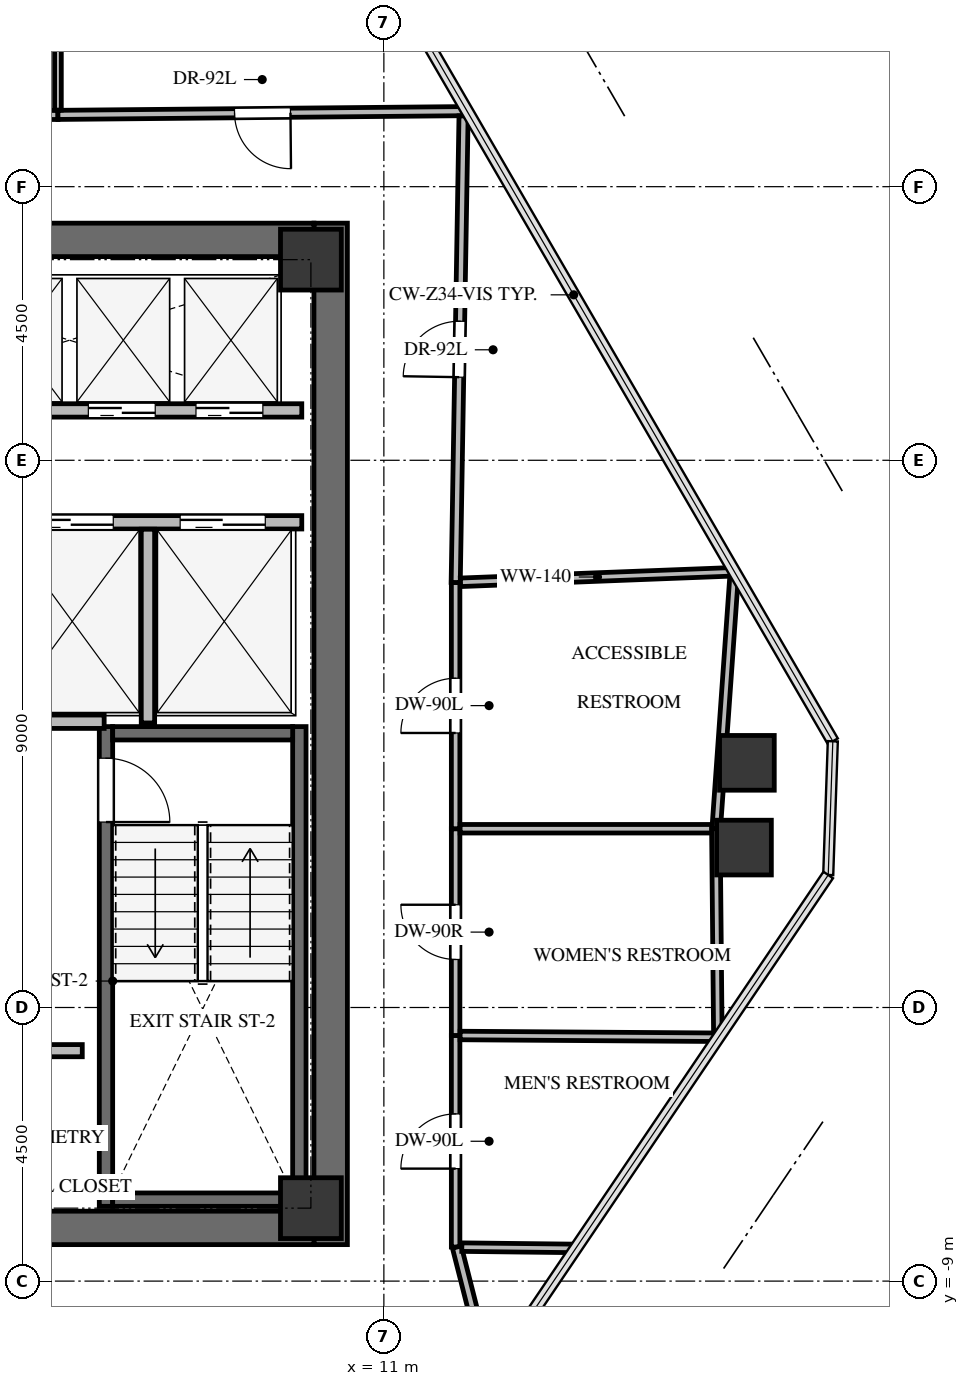
"""IFC4 building model, lengths in metres.
Left out: names, types, materials, properties, quantities, classifications, styles, units other than length and angle.
Written with IfcOpenShell. Run it as: python <this file> out.ifc"""

import sys

from ifc_helpers import new_model, si_unit, direction, frame, frame_2d, origin, origin_2d, place, context, subcontext, project, spatial, rectangle, extrude, source, transform, mapped, element, fill, save


model = new_model("IFC4")
c1 = context("Model", 3, precision=1e-05, world=origin(), true_north=direction((0.0, 1.0)))
c2 = subcontext(c1, "Body", "Model", "MODEL_VIEW")
j1 = project(units=[si_unit("LENGTHUNIT", "METRE"), si_unit("PLANEANGLEUNIT", "RADIAN")], contexts=[c1])
p1 = place(None, origin())
s1 = spatial("IfcSite", under=j1, at=p1, CompositionType="ELEMENT")
p2 = place(p1, origin())
s2 = spatial("IfcBuilding", under=s1, at=p2, CompositionType="ELEMENT")
p3 = place(p2, frame((0.0, 0.0, 261.5)))
s3 = spatial("IfcBuildingStorey", under=s2, at=p3, CompositionType="ELEMENT", Elevation=261.5)
p4 = place(p3, frame((10.125, -8.4, 0.0), z_axis=(0.0, 0.0, 1.0), x_axis=(0.0, 1.0, 0.0)))
e1 = element("IfcWall", 1, at=p4, inside=s3, PredefinedType="SHEAR", context=c2, shape_type="SweptSolid", body=[
    extrude(rectangle(XDim=16.8, YDim=0.55, at=frame_2d((8.4, 0.0))), origin(), (0.0, 0.0, 1.0), 3.4),
])
p5 = place(p3, frame((2.1, -8.125, 0.0), z_axis=(0.0, 0.0, 1.0), x_axis=(1.0, 0.0, 0.0)))
e2 = element("IfcWall", 2, at=p5, inside=s3, PredefinedType="SHEAR", context=c2, shape_type="SweptSolid", body=[
    extrude(rectangle(XDim=7.75, YDim=0.55, at=frame_2d((3.875, 0.0))), origin(), (0.0, 0.0, 1.0), 3.4),
])
p6 = place(p3, frame((-9.85, 8.125, 0.0), z_axis=(0.0, 0.0, 1.0), x_axis=(1.0, 0.0, 0.0)))
e3 = element("IfcWall", 3, at=p6, inside=s3, PredefinedType="SHEAR", context=c2, shape_type="SweptSolid", body=[
    extrude(rectangle(XDim=19.7, YDim=0.55, at=frame_2d((9.85, 0.0))), origin(), (0.0, 0.0, 1.0), 3.4),
])
p7 = place(p3, frame((9.61, -7.77, -0.24), z_axis=(0.0, 0.0, 1.0), x_axis=(0.0, 1.0, 0.0)))
e4 = element("IfcWall", 4, at=p7, inside=s3, PredefinedType="SHEAR", context=c2, shape_type="SweptSolid", body=[
    extrude(rectangle(XDim=7.89, YDim=0.22, at=frame_2d((3.945, 0.0))), origin(), (0.0, 0.0, 1.0), 3.34),
])
p8 = place(p3, frame((6.43, 0.12, -0.24), z_axis=(0.0, 0.0, 1.0), x_axis=(0.0, -1.0, 0.0)))
e5 = element("IfcWall", 5, at=p8, inside=s3, PredefinedType="SHEAR", context=c2, shape_type="SweptSolid", body=[
    extrude(rectangle(XDim=7.89, YDim=0.22, at=frame_2d((3.945, 0.0))), origin(), (0.0, 0.0, 1.0), 3.34),
])
p9 = place(p8, frame((0.52, 0.0, 0.0)))
e6 = element("IfcOpeningElement", 6, at=p9, cuts=e5, PredefinedType="OPENING", context=c2, shape_type="SweptSolid", body=[
    extrude(rectangle(XDim=1.05, YDim=2.15, at=frame_2d((0.525, 1.075))), frame((0.0, 0.12, 0.0), z_axis=(0.0, -1.0, 0.0), x_axis=(1.0, 0.0, 0.0)), (0.0, 0.0, 1.0), 0.24),
])
for number, where, z_axis, x_axis in (
    (7, (6.54, -7.66, -0.24), (0.0, 0.0, 1.0), (1.0, 0.0, 0.0)),
    (8, (9.5, 0.01, -0.24), (0.0, 0.0, 1.0), (-1.0, 0.0, 0.0)),
):
    element("IfcWall", number, at=place(p3, frame(where, z_axis=z_axis, x_axis=x_axis)), inside=s3, PredefinedType="SHEAR", context=c2, shape_type="SweptSolid", body=[
        extrude(rectangle(XDim=2.96, YDim=0.22, at=frame_2d((1.48, 0.0))), origin(), (0.0, 0.0, 1.0), 3.34),
    ])
m1 = source(origin(), c2, "Body", "SweptSolid", [
    extrude(rectangle(XDim=1.0, YDim=1.0, at=origin_2d()), origin(), (0.0, 0.0, 1.0), 3.34),
])
for number, where, z_axis, x_axis in (
    (9, (9.8, -7.8, -0.24), (0.0, 0.0, 1.0), (1.0, 0.0, 0.0)),
    (10, (9.8, 7.8, -0.24), (0.0, 0.0, 1.0), (1.0, 0.0, 0.0)),
):
    element("IfcColumn", number, at=place(p3, frame(where, z_axis=z_axis, x_axis=x_axis)), inside=s3, PredefinedType="COLUMN", context=c2, shape_type="MappedRepresentation", body=[
        mapped(m1, transform((0.0, 0.0, 0.0), x_axis=(1.0, 0.0, 0.0), y_axis=(0.0, 1.0, 0.0), z_axis=(0.0, 0.0, 1.0), scale=1.0)),
    ])
m2 = source(origin(), c2, "Body", "SweptSolid", [
    extrude(rectangle(XDim=0.9, YDim=0.9, at=origin_2d()), origin(), (0.0, 0.0, 1.0), 3.34),
])
for number, where, z_axis, x_axis in (
    (11, (16.97, -0.476, -0.24), (0.0, 0.0, 1.0), (1.0, 0.0, 0.0)),
    (12, (16.922, -1.87, -0.24), (0.0, 0.0, 1.0), (1.0, 0.0, 0.0)),
):
    element("IfcColumn", number, at=place(p3, frame(where, z_axis=z_axis, x_axis=x_axis)), inside=s3, PredefinedType="COLUMN", context=c2, shape_type="MappedRepresentation", body=[
        mapped(m2, transform((0.0, 0.0, 0.0), x_axis=(1.0, 0.0, 0.0), y_axis=(0.0, 1.0, 0.0), z_axis=(0.0, 0.0, 1.0), scale=1.0)),
    ])
p10 = place(p3, frame((4.6, 3.48, 0.0), z_axis=(0.0, 0.0, 1.0), x_axis=(1.0, 0.0, 0.0)))
e13 = element("IfcWall", 13, at=p10, inside=s3, PredefinedType="SOLIDWALL", context=c2, shape_type="SweptSolid", body=[
    extrude(rectangle(XDim=5.05, YDim=0.22, at=frame_2d((2.525, 0.0))), origin(), (0.0, 0.0, 1.0), 3.085),
])
p11 = place(p10, frame((0.55, 0.0, 0.0)))
e14 = element("IfcOpeningElement", 14, at=p11, cuts=e13, PredefinedType="OPENING", context=c2, shape_type="SweptSolid", body=[
    extrude(rectangle(XDim=1.4, YDim=2.15, at=frame_2d((0.7, 1.075))), frame((0.0, 0.12, 0.0), z_axis=(0.0, -1.0, 0.0), x_axis=(1.0, 0.0, 0.0)), (0.0, 0.0, 1.0), 0.24),
])
p12 = place(p10, frame((3.05, 0.0, 0.0)))
e15 = element("IfcOpeningElement", 15, at=p12, cuts=e13, PredefinedType="OPENING", context=c2, shape_type="SweptSolid", body=[
    extrude(rectangle(XDim=1.4, YDim=2.15, at=frame_2d((0.7, 1.075))), frame((0.0, 0.12, 0.0), z_axis=(0.0, -1.0, 0.0), x_axis=(1.0, 0.0, 0.0)), (0.0, 0.0, 1.0), 0.24),
])
p13 = place(p3, frame((7.12, 0.18, 0.0), z_axis=(0.0, 0.0, 1.0), x_axis=(0.0, 1.0, 0.0)))
e16 = element("IfcWall", 16, at=p13, inside=s3, PredefinedType="SOLIDWALL", context=c2, shape_type="SweptSolid", body=[
    extrude(rectangle(XDim=3.186, YDim=0.22, at=frame_2d((1.593, 0.0))), origin(), (0.0, 0.0, 1.0), 3.085),
])
p14 = place(p3, frame((4.734, 0.2, 0.0), z_axis=(0.0, 0.0, 1.0), x_axis=(1.0, 0.0, 0.0)))
e17 = element("IfcWall", 17, at=p14, inside=s3, PredefinedType="SOLIDWALL", context=c2, shape_type="SweptSolid", body=[
    extrude(rectangle(XDim=1.666, YDim=0.22, at=frame_2d((0.833, 0.0))), origin(), (0.0, 0.0, 1.0), 3.085),
])
p15 = place(p3, frame((2.325, 5.32, 0.0), z_axis=(0.0, 0.0, 1.0), x_axis=(1.0, 0.0, 0.0)))
e18 = element("IfcWall", 18, at=p15, inside=s3, PredefinedType="SOLIDWALL", context=c2, shape_type="SweptSolid", body=[
    extrude(rectangle(XDim=7.325, YDim=0.22, at=frame_2d((3.663, 0.0))), origin(), (0.0, 0.0, 1.0), 3.085),
])
p16 = place(p15, frame((0.275, 0.0, 0.0)))
e19 = element("IfcOpeningElement", 19, at=p16, cuts=e18, PredefinedType="OPENING", context=c2, shape_type="SweptSolid", body=[
    extrude(rectangle(XDim=1.1, YDim=2.15, at=frame_2d((0.55, 1.075))), frame((0.0, 0.12, 0.0), z_axis=(0.0, -1.0, 0.0), x_axis=(1.0, 0.0, 0.0)), (0.0, 0.0, 1.0), 0.24),
])
p17 = place(p15, frame((2.045, 0.0, 0.0)))
e20 = element("IfcOpeningElement", 20, at=p17, cuts=e18, PredefinedType="OPENING", context=c2, shape_type="SweptSolid", body=[
    extrude(rectangle(XDim=1.1, YDim=2.15, at=frame_2d((0.55, 1.075))), frame((0.0, 0.12, 0.0), z_axis=(0.0, -1.0, 0.0), x_axis=(1.0, 0.0, 0.0)), (0.0, 0.0, 1.0), 0.24),
])
p18 = place(p15, frame((3.815, 0.0, 0.0)))
e21 = element("IfcOpeningElement", 21, at=p18, cuts=e18, PredefinedType="OPENING", context=c2, shape_type="SweptSolid", body=[
    extrude(rectangle(XDim=1.1, YDim=2.15, at=frame_2d((0.55, 1.075))), frame((0.0, 0.12, 0.0), z_axis=(0.0, -1.0, 0.0), x_axis=(1.0, 0.0, 0.0)), (0.0, 0.0, 1.0), 0.24),
])
p19 = place(p15, frame((5.585, 0.0, 0.0)))
e22 = element("IfcOpeningElement", 22, at=p19, cuts=e18, PredefinedType="OPENING", context=c2, shape_type="SweptSolid", body=[
    extrude(rectangle(XDim=1.1, YDim=2.15, at=frame_2d((0.55, 1.075))), frame((0.0, 0.12, 0.0), z_axis=(0.0, -1.0, 0.0), x_axis=(1.0, 0.0, 0.0)), (0.0, 0.0, 1.0), 0.24),
])
p20 = place(p3, frame((2.51, -5.21, 0.0), z_axis=(0.0, 0.0, 1.0), x_axis=(1.0, 0.0, 0.0)))
e23 = element("IfcWall", 23, at=p20, inside=s3, PredefinedType="SOLIDWALL", context=c2, shape_type="SweptSolid", body=[
    extrude(rectangle(XDim=3.53, YDim=0.2, at=frame_2d((1.765, 0.0))), origin(), (0.0, 0.0, 1.0), 3.085),
])
p21 = place(p20, frame((1.315, 0.0, 0.0)))
e24 = element("IfcOpeningElement", 24, at=p21, cuts=e23, PredefinedType="OPENING", context=c2, shape_type="SweptSolid", body=[
    extrude(rectangle(XDim=0.9, YDim=2.05, at=frame_2d((0.45, 1.025))), frame((0.0, 0.11, 0.0), z_axis=(0.0, -1.0, 0.0), x_axis=(1.0, 0.0, 0.0)), (0.0, 0.0, 1.0), 0.22),
])
p22 = place(p3, frame((12.18, -8.44, 0.0), z_axis=(0.0, 0.0, 1.0), x_axis=(0.0, 1.0, 0.0)))
e25 = element("IfcWall", 25, at=p22, inside=s3, PredefinedType="PARTITIONING", context=c2, shape_type="SweptSolid", body=[
    extrude(rectangle(XDim=3.48, YDim=0.14, at=frame_2d((1.74, 0.0))), origin(), (0.0, 0.0, 1.0), 2.439),
])
p23 = place(p22, frame((1.29, 0.0, 0.0)))
e26 = element("IfcOpeningElement", 26, at=p23, cuts=e25, PredefinedType="OPENING", context=c2, shape_type="SweptSolid", body=[
    extrude(rectangle(XDim=0.9, YDim=2.05, at=frame_2d((0.45, 1.025))), frame((0.0, 0.08, 0.0), z_axis=(0.0, -1.0, 0.0), x_axis=(1.0, 0.0, 0.0)), (0.0, 0.0, 1.0), 0.16),
])
p24 = place(p3, frame((12.18, -4.96, 0.0), z_axis=(0.0, 0.0, 1.0), x_axis=(0.0, 1.0, 0.0)))
e27 = element("IfcWall", 27, at=p24, inside=s3, PredefinedType="PARTITIONING", context=c2, shape_type="SweptSolid", body=[
    extrude(rectangle(XDim=3.4, YDim=0.14, at=frame_2d((1.7, 0.0))), origin(), (0.0, 0.0, 1.0), 3.085),
])
p25 = place(p24, frame((1.25, 0.0, 0.0)))
e28 = element("IfcOpeningElement", 28, at=p25, cuts=e27, PredefinedType="OPENING", context=c2, shape_type="SweptSolid", body=[
    extrude(rectangle(XDim=0.9, YDim=2.05, at=frame_2d((0.45, 1.025))), frame((0.0, 0.08, 0.0), z_axis=(0.0, -1.0, 0.0), x_axis=(1.0, 0.0, 0.0)), (0.0, 0.0, 1.0), 0.16),
])
p26 = place(p3, frame((12.18, -1.56, 0.0), z_axis=(0.0, 0.0, 1.0), x_axis=(0.0, 1.0, 0.0)))
e29 = element("IfcWall", 29, at=p26, inside=s3, PredefinedType="PARTITIONING", context=c2, shape_type="SweptSolid", body=[
    extrude(rectangle(XDim=4.05, YDim=0.14, at=frame_2d((2.025, 0.0))), origin(), (0.0, 0.0, 1.0), 2.341),
])
p27 = place(p26, frame((1.575, 0.0, 0.0)))
e30 = element("IfcOpeningElement", 30, at=p27, cuts=e29, PredefinedType="OPENING", context=c2, shape_type="SweptSolid", body=[
    extrude(rectangle(XDim=0.9, YDim=2.05, at=frame_2d((0.45, 1.025))), frame((0.0, 0.08, 0.0), z_axis=(0.0, -1.0, 0.0), x_axis=(1.0, 0.0, 0.0)), (0.0, 0.0, 1.0), 0.16),
])
p28 = place(p3, frame((5.64, 10.18, 0.0), z_axis=(0.0, 0.0, 1.0), x_axis=(-1.0, 0.0, 0.0)))
e31 = element("IfcWall", 31, at=p28, inside=s3, PredefinedType="PARTITIONING", context=c2, shape_type="SweptSolid", body=[
    extrude(rectangle(XDim=4.551, YDim=0.15, at=frame_2d((2.275, 0.0))), origin(), (0.0, 0.0, 1.0), 2.648),
])
p29 = place(p3, frame((12.368, 10.243, 0.0), z_axis=(0.0, 0.0, 1.0), x_axis=(-0.999957198001, -0.009252143886, 0.0)))
e32 = element("IfcWall", 32, at=p29, inside=s3, PredefinedType="PARTITIONING", context=c2, shape_type="SweptSolid", body=[
    extrude(rectangle(XDim=6.729, YDim=0.15, at=frame_2d((3.364, 0.0))), origin(), (0.0, 0.0, 1.0), 2.341),
])
p30 = place(p29, frame((2.904, 0.0, 0.0)))
e33 = element("IfcOpeningElement", 33, at=p30, cuts=e32, PredefinedType="OPENING", context=c2, shape_type="SweptSolid", body=[
    extrude(rectangle(XDim=0.92, YDim=2.1, at=frame_2d((0.46, 1.05))), frame((0.0, 0.085, 0.0), z_axis=(0.0, -1.0, 0.0), x_axis=(1.0, 0.0, 0.0)), (0.0, 0.0, 1.0), 0.17),
])
p31 = place(p3, frame((12.719, -10.478, 0.0), z_axis=(0.0, 0.0, 1.0), x_axis=(-0.246467162934, 0.969151142803, 0.0)))
e34 = element("IfcWall", 34, at=p31, inside=s3, PredefinedType="PARTITIONING", context=c2, shape_type="SweptSolid", body=[
    extrude(rectangle(XDim=2.103, YDim=0.15, at=frame_2d((1.052, 0.0))), origin(), (0.0, 0.0, 1.0), 2.439),
])
p32 = place(p3, frame((12.181, 2.49, 0.0), z_axis=(0.0, 0.0, 1.0), x_axis=(0.016828669653, 0.999858387912, 0.0)))
e35 = element("IfcWall", 35, at=p32, inside=s3, PredefinedType="PARTITIONING", context=c2, shape_type="SweptSolid", body=[
    extrude(rectangle(XDim=7.674, YDim=0.15, at=frame_2d((3.837, 0.0))), origin(), (0.0, 0.0, 1.0), 2.439),
])
p33 = place(p32, frame((3.377, 0.0, 0.0)))
e36 = element("IfcOpeningElement", 36, at=p33, cuts=e35, PredefinedType="OPENING", context=c2, shape_type="SweptSolid", body=[
    extrude(rectangle(XDim=0.92, YDim=2.1, at=frame_2d((0.46, 1.05))), frame((0.0, 0.085, 0.0), z_axis=(0.0, -1.0, 0.0), x_axis=(1.0, 0.0, 0.0)), (0.0, 0.0, 1.0), 0.17),
])
p34 = place(p3, frame((12.254, -4.96, 0.0), z_axis=(0.0, 0.0, 1.0), x_axis=(0.999976630429, -0.006836563198, 0.0)))
e37 = element("IfcWall", 37, at=p34, inside=s3, PredefinedType="PARTITIONING", context=c2, shape_type="SweptSolid", body=[
    extrude(rectangle(XDim=4.25, YDim=0.14, at=frame_2d((2.125, 0.0))), origin(), (0.0, 0.0, 1.0), 2.439),
])
p35 = place(p3, frame((14.156, -8.462, 0.0), z_axis=(0.0, 0.0, 1.0), x_axis=(-0.999935742613, 0.011336253532, 0.0)))
e38 = element("IfcWall", 38, at=p35, inside=s3, PredefinedType="PARTITIONING", context=c2, shape_type="SweptSolid", body=[
    extrude(rectangle(XDim=1.874, YDim=0.14, at=frame_2d((0.937, 0.0))), origin(), (0.0, 0.0, 1.0), 2.439),
])
p36 = place(p3, frame((12.254, -1.56, 0.0), z_axis=(0.0, 0.0, 1.0), x_axis=(1.0, 0.0, 0.0)))
e39 = element("IfcWall", 39, at=p36, inside=s3, PredefinedType="PARTITIONING", context=c2, shape_type="SweptSolid", body=[
    extrude(rectangle(XDim=4.206, YDim=0.14, at=frame_2d((2.103, 0.0))), origin(), (0.0, 0.0, 1.0), 2.341),
])
p37 = place(p3, frame((16.46, -1.56, 0.0), z_axis=(0.0, 0.0, 1.0), x_axis=(0.009604446748, -0.999953876238, 0.0)))
e40 = element("IfcWall", 40, at=p37, inside=s3, PredefinedType="PARTITIONING", context=c2, shape_type="SweptSolid", body=[
    extrude(rectangle(XDim=3.355, YDim=0.14, at=frame_2d((1.678, 0.0))), origin(), (0.0, 0.0, 1.0), 2.341),
])
p38 = place(p3, frame((12.26, 2.493, 0.0), z_axis=(0.0, 0.0, 1.0), x_axis=(0.999256206289, 0.038562082324, 0.0)))
e41 = element("IfcWall", 41, at=p38, inside=s3, PredefinedType="PARTITIONING", context=c2, shape_type="SweptSolid", body=[
    extrude(rectangle(XDim=4.508, YDim=0.14, at=frame_2d((2.254, 0.0))), origin(), (0.0, 0.0, 1.0), 2.439),
])
p39 = place(p3, frame((16.76, 2.593, 0.0), z_axis=(0.0, 0.0, 1.0), x_axis=(-0.07055102187, -0.997508172053, 0.0)))
e42 = element("IfcWall", 42, at=p39, inside=s3, PredefinedType="PARTITIONING", context=c2, shape_type="SweptSolid", body=[
    extrude(rectangle(XDim=4.163, YDim=0.14, at=frame_2d((2.082, 0.0))), origin(), (0.0, 0.0, 1.0), 2.341),
])
p40 = place(p3, frame((5.64, 15.662, 0.0), z_axis=(0.0, 0.0, 1.0), x_axis=(0.0, -1.0, 0.0)))
e43 = element("IfcWall", 43, at=p40, inside=s3, PredefinedType="MOVABLE", context=c2, shape_type="SweptSolid", body=[
    extrude(rectangle(XDim=5.402, YDim=0.11, at=frame_2d((2.701, 0.0))), origin(), (0.0, 0.0, 1.0), 2.439),
])
m3 = source(origin(), c2, "Body", "SweptSolid", [
    extrude(rectangle(XDim=1.05, YDim=2.15, at=frame_2d((0.525, 1.075))), frame((0.0, 0.025, 0.0), z_axis=(0.0, -1.0, 0.0), x_axis=(1.0, 0.0, 0.0)), (0.0, 0.0, 1.0), 0.05),
])
p41 = place(p9, origin())
e44 = element("IfcDoor", 44, at=p41, inside=s3, OperationType="SINGLE_SWING_RIGHT", PredefinedType="DOOR", context=c2, shape_type="MappedRepresentation", body=[
    mapped(m3, transform((0.0, 0.0, 0.0), x_axis=(1.0, 0.0, 0.0), y_axis=(0.0, 1.0, 0.0), z_axis=(0.0, 0.0, 1.0), scale=1.0)),
])
fill(e6, e44)
m4 = source(origin(), c2, "Body", "SweptSolid", [
    extrude(rectangle(XDim=1.4, YDim=2.15, at=frame_2d((0.7, 1.075))), frame((0.0, 0.025, 0.0), z_axis=(0.0, -1.0, 0.0), x_axis=(1.0, 0.0, 0.0)), (0.0, 0.0, 1.0), 0.05),
])
p42 = place(p11, origin())
e45 = element("IfcDoor", 45, at=p42, inside=s3, OperationType="DOUBLE_DOOR_SLIDING", PredefinedType="DOOR", context=c2, shape_type="MappedRepresentation", body=[
    mapped(m4, transform((0.0, 0.0, 0.0), x_axis=(1.0, 0.0, 0.0), y_axis=(0.0, 1.0, 0.0), z_axis=(0.0, 0.0, 1.0), scale=1.0)),
])
fill(e14, e45)
p43 = place(p12, origin())
e46 = element("IfcDoor", 46, at=p43, inside=s3, OperationType="DOUBLE_DOOR_SLIDING", PredefinedType="DOOR", context=c2, shape_type="MappedRepresentation", body=[
    mapped(m4, transform((0.0, 0.0, 0.0), x_axis=(1.0, 0.0, 0.0), y_axis=(0.0, 1.0, 0.0), z_axis=(0.0, 0.0, 1.0), scale=1.0)),
])
fill(e15, e46)
m5 = source(origin(), c2, "Body", "SweptSolid", [
    extrude(rectangle(XDim=1.1, YDim=2.15, at=frame_2d((0.55, 1.075))), frame((0.0, 0.025, 0.0), z_axis=(0.0, -1.0, 0.0), x_axis=(1.0, 0.0, 0.0)), (0.0, 0.0, 1.0), 0.05),
])
p44 = place(p18, origin())
e47 = element("IfcDoor", 47, at=p44, inside=s3, OperationType="DOUBLE_DOOR_SLIDING", PredefinedType="DOOR", context=c2, shape_type="MappedRepresentation", body=[
    mapped(m5, transform((0.0, 0.0, 0.0), x_axis=(1.0, 0.0, 0.0), y_axis=(0.0, 1.0, 0.0), z_axis=(0.0, 0.0, 1.0), scale=1.0)),
])
fill(e21, e47)
p45 = place(p19, origin())
e48 = element("IfcDoor", 48, at=p45, inside=s3, OperationType="DOUBLE_DOOR_SLIDING", PredefinedType="DOOR", context=c2, shape_type="MappedRepresentation", body=[
    mapped(m5, transform((0.0, 0.0, 0.0), x_axis=(1.0, 0.0, 0.0), y_axis=(0.0, 1.0, 0.0), z_axis=(0.0, 0.0, 1.0), scale=1.0)),
])
fill(e22, e48)
m6 = source(origin(), c2, "Body", "SweptSolid", [
    extrude(rectangle(XDim=0.9, YDim=2.05, at=frame_2d((0.45, 1.025))), frame((0.0, 0.025, 0.0), z_axis=(0.0, -1.0, 0.0), x_axis=(1.0, 0.0, 0.0)), (0.0, 0.0, 1.0), 0.05),
])
p46 = place(p23, origin())
e49 = element("IfcDoor", 49, at=p46, inside=s3, OperationType="SINGLE_SWING_LEFT", PredefinedType="DOOR", context=c2, shape_type="MappedRepresentation", body=[
    mapped(m6, transform((0.0, 0.0, 0.0), x_axis=(1.0, 0.0, 0.0), y_axis=(0.0, 1.0, 0.0), z_axis=(0.0, 0.0, 1.0), scale=1.0)),
])
fill(e26, e49)
m7 = source(origin(), c2, "Body", "SweptSolid", [
    extrude(rectangle(XDim=0.9, YDim=2.05, at=frame_2d((0.45, 1.025))), frame((0.0, 0.025, 0.0), z_axis=(0.0, -1.0, 0.0), x_axis=(1.0, 0.0, 0.0)), (0.0, 0.0, 1.0), 0.05),
])
p47 = place(p25, origin())
e50 = element("IfcDoor", 50, at=p47, inside=s3, OperationType="SINGLE_SWING_RIGHT", PredefinedType="DOOR", context=c2, shape_type="MappedRepresentation", body=[
    mapped(m7, transform((0.0, 0.0, 0.0), x_axis=(1.0, 0.0, 0.0), y_axis=(0.0, 1.0, 0.0), z_axis=(0.0, 0.0, 1.0), scale=1.0)),
])
fill(e28, e50)
p48 = place(p27, origin())
e51 = element("IfcDoor", 51, at=p48, inside=s3, OperationType="SINGLE_SWING_LEFT", PredefinedType="DOOR", context=c2, shape_type="MappedRepresentation", body=[
    mapped(m6, transform((0.0, 0.0, 0.0), x_axis=(1.0, 0.0, 0.0), y_axis=(0.0, 1.0, 0.0), z_axis=(0.0, 0.0, 1.0), scale=1.0)),
])
fill(e30, e51)
m8 = source(origin(), c2, "Body", "SweptSolid", [
    extrude(rectangle(XDim=0.92, YDim=2.1, at=frame_2d((0.46, 1.05))), frame((0.0, 0.025, 0.0), z_axis=(0.0, -1.0, 0.0), x_axis=(1.0, 0.0, 0.0)), (0.0, 0.0, 1.0), 0.05),
])
p49 = place(p30, origin())
e52 = element("IfcDoor", 52, at=p49, inside=s3, OperationType="SINGLE_SWING_LEFT", PredefinedType="DOOR", context=c2, shape_type="MappedRepresentation", body=[
    mapped(m8, transform((0.0, 0.0, 0.0), x_axis=(1.0, 0.0, 0.0), y_axis=(0.0, 1.0, 0.0), z_axis=(0.0, 0.0, 1.0), scale=1.0)),
])
fill(e33, e52)
p50 = place(p33, origin())
e53 = element("IfcDoor", 53, at=p50, inside=s3, OperationType="SINGLE_SWING_LEFT", PredefinedType="DOOR", context=c2, shape_type="MappedRepresentation", body=[
    mapped(m8, transform((0.0, 0.0, 0.0), x_axis=(1.0, 0.0, 0.0), y_axis=(0.0, 1.0, 0.0), z_axis=(0.0, 0.0, 1.0), scale=1.0)),
])
fill(e36, e53)
save(model, sys.argv[1])
